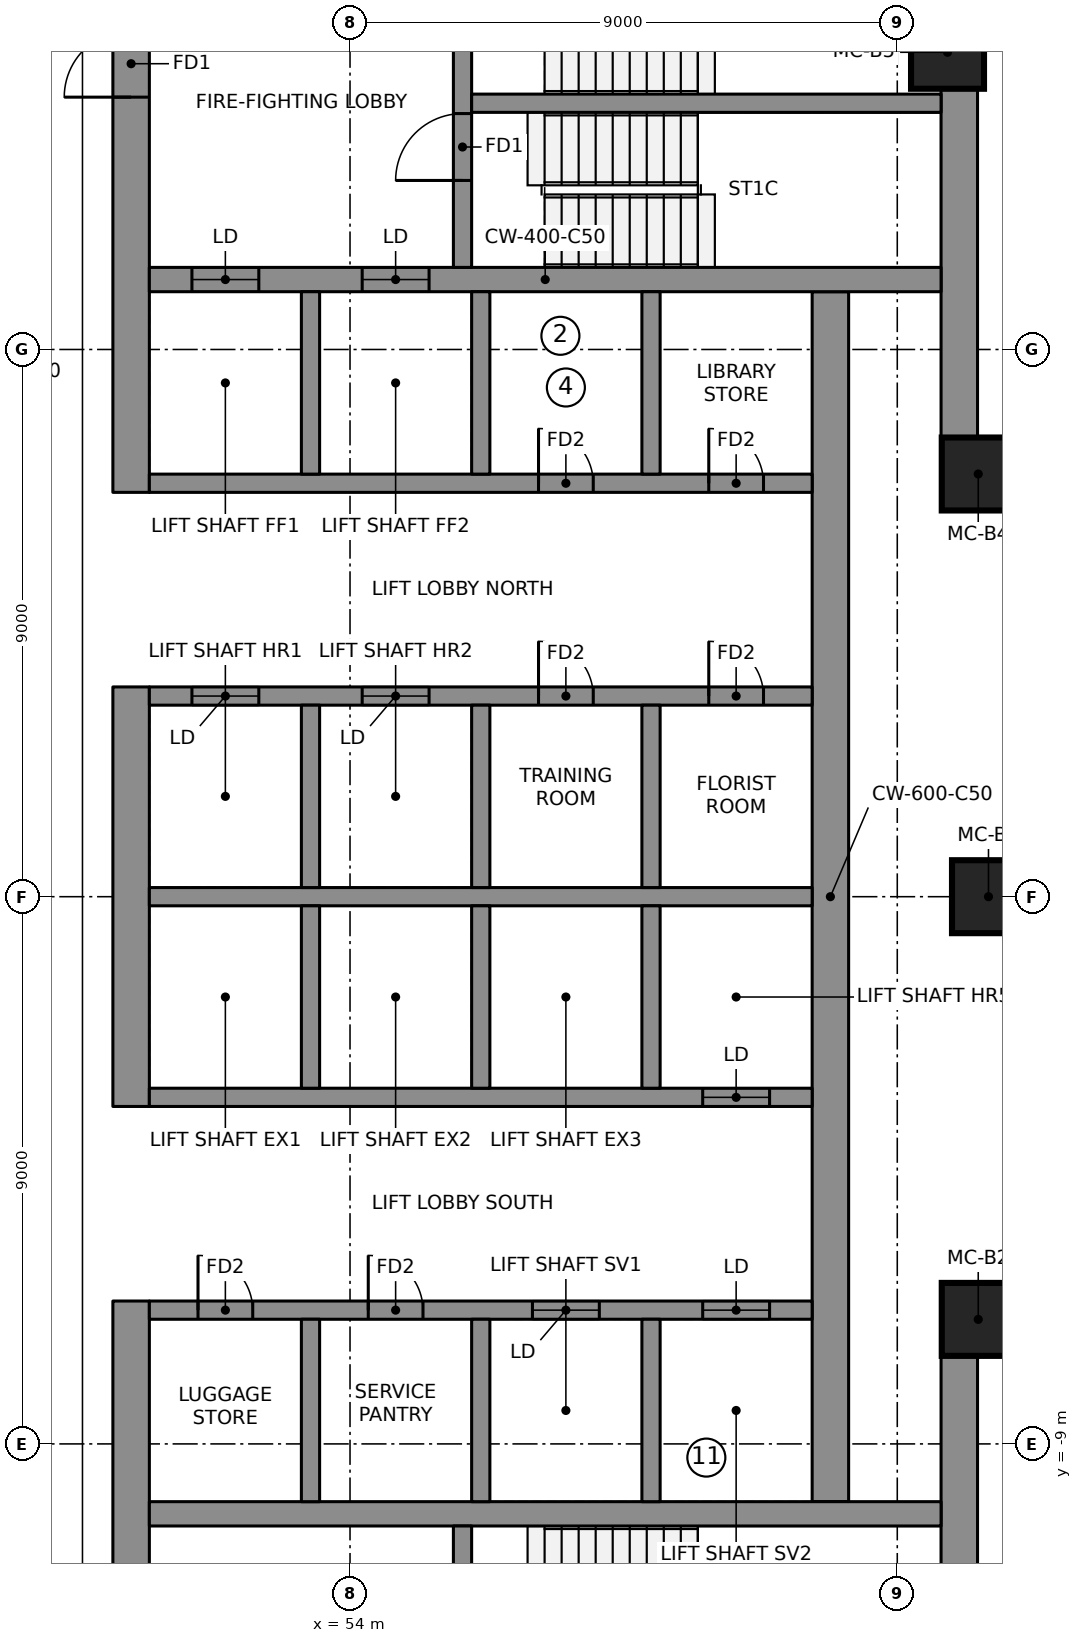
"""IFC4 building model, lengths in metres.
Left out: names, types, materials, properties, quantities, classifications, styles, units other than length and angle.
Written with IfcOpenShell. Run it as: python <this file> out.ifc"""

import sys

from ifc_helpers import new_model, si_unit, direction, frame, frame_2d, origin, origin_2d, place, context, subcontext, project, spatial, rectangle, extrude, element, fill, save


model = new_model("IFC4")
c1 = context("Model", 3, precision=1e-05, world=origin(), true_north=direction((0.0, 1.0)))
c2 = subcontext(c1, "Body", "Model", "MODEL_VIEW")
j1 = project(units=[si_unit("LENGTHUNIT", "METRE"), si_unit("PLANEANGLEUNIT", "RADIAN")], contexts=[c1])
p1 = place(None, origin())
s1 = spatial("IfcSite", under=j1, at=p1, CompositionType="ELEMENT")
p2 = place(p1, origin())
s2 = spatial("IfcBuilding", under=s1, at=p2, CompositionType="ELEMENT")
p3 = place(p2, frame((0.0, 0.0, 235.0)))
s3 = spatial("IfcBuildingStorey", under=s2, at=p3, CompositionType="ELEMENT", Elevation=235.0)
p4 = place(p3, frame((50.4, 6.65, 0.0), z_axis=(0.0, 0.0, 1.0), x_axis=(0.0, 1.0, 0.0)))
e1 = element("IfcWall", 1, at=p4, inside=s3, PredefinedType="SHEAR", context=c2, shape_type="SweptSolid", body=[
    extrude(rectangle(XDim=9.7, YDim=0.6, at=frame_2d((4.85, 0.0))), origin(), (0.0, 0.0, 1.0), 3.55),
])
p5 = place(p4, frame((6.5, 0.0, 0.0)))
e2 = element("IfcOpeningElement", 2, at=p5, cuts=e1, PredefinedType="OPENING", context=c2, shape_type="SweptSolid", body=[
    extrude(rectangle(XDim=1.1, YDim=2.1, at=frame_2d((0.55, 1.05))), frame((0.0, 0.31, 0.0), z_axis=(0.0, -1.0, 0.0), x_axis=(1.0, 0.0, 0.0)), (0.0, 0.0, 1.0), 0.62),
])
p6 = place(p3, frame((50.4, -3.45, 0.0), z_axis=(0.0, 0.0, 1.0), x_axis=(0.0, 1.0, 0.0)))
e3 = element("IfcWall", 3, at=p6, inside=s3, PredefinedType="SHEAR", context=c2, shape_type="SweptSolid", body=[
    extrude(rectangle(XDim=6.9, YDim=0.6, at=frame_2d((3.45, 0.0))), origin(), (0.0, 0.0, 1.0), 3.55),
])
p7 = place(p3, frame((50.4, -16.35, 0.0), z_axis=(0.0, 0.0, 1.0), x_axis=(0.0, 1.0, 0.0)))
e4 = element("IfcWall", 4, at=p7, inside=s3, PredefinedType="SHEAR", context=c2, shape_type="SweptSolid", body=[
    extrude(rectangle(XDim=9.7, YDim=0.6, at=frame_2d((4.85, 0.0))), origin(), (0.0, 0.0, 1.0), 3.55),
])
p8 = place(p7, frame((2.1, 0.0, 0.0)))
e5 = element("IfcOpeningElement", 5, at=p8, cuts=e4, PredefinedType="OPENING", context=c2, shape_type="SweptSolid", body=[
    extrude(rectangle(XDim=1.1, YDim=2.1, at=frame_2d((0.55, 1.05))), frame((0.0, 0.31, 0.0), z_axis=(0.0, -1.0, 0.0), x_axis=(1.0, 0.0, 0.0)), (0.0, 0.0, 1.0), 0.62),
])
for number, where, z_axis, x_axis in (
    (6, (64.02, 7.502, 0.0), (0.0, 0.0, 1.0), (0.0, 1.0, 0.0)),
    (7, (64.02, -15.75, 0.0), (0.0, 0.0, 1.0), (0.0, 1.0, 0.0)),
):
    element("IfcWall", number, at=place(p3, frame(where, z_axis=z_axis, x_axis=x_axis)), inside=s3, PredefinedType="SHEAR", context=c2, shape_type="SweptSolid", body=[
        extrude(rectangle(XDim=8.248, YDim=0.6, at=frame_2d((4.124, 0.0))), origin(), (0.0, 0.0, 1.0), 3.55),
    ])
p9 = place(p3, frame((61.9, -9.95, 0.0), z_axis=(0.0, 0.0, 1.0), x_axis=(0.0, 1.0, 0.0)))
e8 = element("IfcWall", 8, at=p9, inside=s3, PredefinedType="SHEAR", context=c2, shape_type="SweptSolid", body=[
    extrude(rectangle(XDim=19.9, YDim=0.6, at=frame_2d((9.95, 0.0))), origin(), (0.0, 0.0, 1.0), 3.55),
])
p10 = place(p3, frame((50.7, 10.15, 0.0), z_axis=(0.0, 0.0, 1.0), x_axis=(1.0, 0.0, 0.0)))
e9 = element("IfcWall", 9, at=p10, inside=s3, PredefinedType="SHEAR", context=c2, shape_type="SweptSolid", body=[
    extrude(rectangle(XDim=13.02, YDim=0.4, at=frame_2d((6.51, 0.0))), origin(), (0.0, 0.0, 1.0), 3.55),
])
p11 = place(p10, frame((0.7, 0.0, 0.0)))
e10 = element("IfcOpeningElement", 10, at=p11, cuts=e9, PredefinedType="OPENING", context=c2, shape_type="SweptSolid", body=[
    extrude(rectangle(XDim=1.1, YDim=2.1, at=frame_2d((0.55, 1.05))), frame((0.0, 0.21, 0.0), z_axis=(0.0, -1.0, 0.0), x_axis=(1.0, 0.0, 0.0)), (0.0, 0.0, 1.0), 0.42),
])
p12 = place(p10, frame((3.5, 0.0, 0.0)))
e11 = element("IfcOpeningElement", 11, at=p12, cuts=e9, PredefinedType="OPENING", context=c2, shape_type="SweptSolid", body=[
    extrude(rectangle(XDim=1.1, YDim=2.1, at=frame_2d((0.55, 1.05))), frame((0.0, 0.21, 0.0), z_axis=(0.0, -1.0, 0.0), x_axis=(1.0, 0.0, 0.0)), (0.0, 0.0, 1.0), 0.42),
])
p13 = place(p3, frame((50.7, -10.15, 0.0), z_axis=(0.0, 0.0, 1.0), x_axis=(1.0, 0.0, 0.0)))
e12 = element("IfcWall", 12, at=p13, inside=s3, PredefinedType="SHEAR", context=c2, shape_type="SweptSolid", body=[
    extrude(rectangle(XDim=13.02, YDim=0.4, at=frame_2d((6.51, 0.0))), origin(), (0.0, 0.0, 1.0), 3.55),
])
p14 = place(p3, frame((50.7, 0.0, 0.0), z_axis=(0.0, 0.0, 1.0), x_axis=(1.0, 0.0, 0.0)))
e13 = element("IfcWall", 13, at=p14, inside=s3, PredefinedType="SHEAR", context=c2, shape_type="SweptSolid", body=[
    extrude(rectangle(XDim=10.9, YDim=0.3, at=frame_2d((5.45, 0.0))), origin(), (0.0, 0.0, 1.0), 3.55),
])
p15 = place(p3, frame((50.7, 3.3, 0.0), z_axis=(0.0, 0.0, 1.0), x_axis=(1.0, 0.0, 0.0)))
e14 = element("IfcWall", 14, at=p15, inside=s3, PredefinedType="SHEAR", context=c2, shape_type="SweptSolid", body=[
    extrude(rectangle(XDim=10.9, YDim=0.3, at=frame_2d((5.45, 0.0))), origin(), (0.0, 0.0, 1.0), 3.55),
])
p16 = place(p15, frame((0.7, 0.0, 0.0)))
e15 = element("IfcOpeningElement", 15, at=p16, cuts=e14, PredefinedType="OPENING", context=c2, shape_type="SweptSolid", body=[
    extrude(rectangle(XDim=1.1, YDim=2.1, at=frame_2d((0.55, 1.05))), frame((0.0, 0.16, 0.0), z_axis=(0.0, -1.0, 0.0), x_axis=(1.0, 0.0, 0.0)), (0.0, 0.0, 1.0), 0.32),
])
p17 = place(p15, frame((3.5, 0.0, 0.0)))
e16 = element("IfcOpeningElement", 16, at=p17, cuts=e14, PredefinedType="OPENING", context=c2, shape_type="SweptSolid", body=[
    extrude(rectangle(XDim=1.1, YDim=2.1, at=frame_2d((0.55, 1.05))), frame((0.0, 0.16, 0.0), z_axis=(0.0, -1.0, 0.0), x_axis=(1.0, 0.0, 0.0)), (0.0, 0.0, 1.0), 0.32),
])
p18 = place(p15, frame((6.4, 0.0, 0.0)))
e17 = element("IfcOpeningElement", 17, at=p18, cuts=e14, PredefinedType="OPENING", context=c2, shape_type="SweptSolid", body=[
    extrude(rectangle(XDim=0.9, YDim=2.1, at=frame_2d((0.45, 1.05))), frame((0.0, 0.16, 0.0), z_axis=(0.0, -1.0, 0.0), x_axis=(1.0, 0.0, 0.0)), (0.0, 0.0, 1.0), 0.32),
])
p19 = place(p15, frame((9.2, 0.0, 0.0)))
e18 = element("IfcOpeningElement", 18, at=p19, cuts=e14, PredefinedType="OPENING", context=c2, shape_type="SweptSolid", body=[
    extrude(rectangle(XDim=0.9, YDim=2.1, at=frame_2d((0.45, 1.05))), frame((0.0, 0.16, 0.0), z_axis=(0.0, -1.0, 0.0), x_axis=(1.0, 0.0, 0.0)), (0.0, 0.0, 1.0), 0.32),
])
p20 = place(p3, frame((50.7, 6.8, 0.0), z_axis=(0.0, 0.0, 1.0), x_axis=(1.0, 0.0, 0.0)))
e19 = element("IfcWall", 19, at=p20, inside=s3, PredefinedType="SHEAR", context=c2, shape_type="SweptSolid", body=[
    extrude(rectangle(XDim=10.9, YDim=0.3, at=frame_2d((5.45, 0.0))), origin(), (0.0, 0.0, 1.0), 3.55),
])
p21 = place(p20, frame((6.4, 0.0, 0.0)))
e20 = element("IfcOpeningElement", 20, at=p21, cuts=e19, PredefinedType="OPENING", context=c2, shape_type="SweptSolid", body=[
    extrude(rectangle(XDim=0.9, YDim=2.1, at=frame_2d((0.45, 1.05))), frame((0.0, 0.16, 0.0), z_axis=(0.0, -1.0, 0.0), x_axis=(1.0, 0.0, 0.0)), (0.0, 0.0, 1.0), 0.32),
])
p22 = place(p20, frame((9.2, 0.0, 0.0)))
e21 = element("IfcOpeningElement", 21, at=p22, cuts=e19, PredefinedType="OPENING", context=c2, shape_type="SweptSolid", body=[
    extrude(rectangle(XDim=0.9, YDim=2.1, at=frame_2d((0.45, 1.05))), frame((0.0, 0.16, 0.0), z_axis=(0.0, -1.0, 0.0), x_axis=(1.0, 0.0, 0.0)), (0.0, 0.0, 1.0), 0.32),
])
for number, where, z_axis, x_axis in (
    (22, (53.35, 0.15, 0.0), (0.0, 0.0, 1.0), (0.0, 1.0, 0.0)),
    (23, (53.35, 6.95, 0.0), (0.0, 0.0, 1.0), (0.0, 1.0, 0.0)),
    (24, (56.15, 0.15, 0.0), (0.0, 0.0, 1.0), (0.0, 1.0, 0.0)),
    (25, (56.15, 6.95, 0.0), (0.0, 0.0, 1.0), (0.0, 1.0, 0.0)),
    (26, (58.95, 0.15, 0.0), (0.0, 0.0, 1.0), (0.0, 1.0, 0.0)),
    (27, (58.95, 6.95, 0.0), (0.0, 0.0, 1.0), (0.0, 1.0, 0.0)),
):
    element("IfcWall", number, at=place(p3, frame(where, z_axis=z_axis, x_axis=x_axis)), inside=s3, PredefinedType="SHEAR", context=c2, shape_type="SweptSolid", body=[
        extrude(rectangle(XDim=3.0, YDim=0.3, at=frame_2d((1.5, 0.0))), origin(), (0.0, 0.0, 1.0), 3.55),
    ])
p23 = place(p3, frame((50.7, -3.3, 0.0), z_axis=(0.0, 0.0, 1.0), x_axis=(1.0, 0.0, 0.0)))
e28 = element("IfcWall", 28, at=p23, inside=s3, PredefinedType="SHEAR", context=c2, shape_type="SweptSolid", body=[
    extrude(rectangle(XDim=10.9, YDim=0.3, at=frame_2d((5.45, 0.0))), origin(), (0.0, 0.0, 1.0), 3.55),
])
p24 = place(p23, frame((9.1, 0.0, 0.0)))
e29 = element("IfcOpeningElement", 29, at=p24, cuts=e28, PredefinedType="OPENING", context=c2, shape_type="SweptSolid", body=[
    extrude(rectangle(XDim=1.1, YDim=2.1, at=frame_2d((0.55, 1.05))), frame((0.0, 0.16, 0.0), z_axis=(0.0, -1.0, 0.0), x_axis=(1.0, 0.0, 0.0)), (0.0, 0.0, 1.0), 0.32),
])
p25 = place(p3, frame((50.7, -6.8, 0.0), z_axis=(0.0, 0.0, 1.0), x_axis=(1.0, 0.0, 0.0)))
e30 = element("IfcWall", 30, at=p25, inside=s3, PredefinedType="SHEAR", context=c2, shape_type="SweptSolid", body=[
    extrude(rectangle(XDim=10.9, YDim=0.3, at=frame_2d((5.45, 0.0))), origin(), (0.0, 0.0, 1.0), 3.55),
])
p26 = place(p25, frame((6.3, 0.0, 0.0)))
e31 = element("IfcOpeningElement", 31, at=p26, cuts=e30, PredefinedType="OPENING", context=c2, shape_type="SweptSolid", body=[
    extrude(rectangle(XDim=1.1, YDim=2.1, at=frame_2d((0.55, 1.05))), frame((0.0, 0.16, 0.0), z_axis=(0.0, -1.0, 0.0), x_axis=(1.0, 0.0, 0.0)), (0.0, 0.0, 1.0), 0.32),
])
p27 = place(p25, frame((9.1, 0.0, 0.0)))
e32 = element("IfcOpeningElement", 32, at=p27, cuts=e30, PredefinedType="OPENING", context=c2, shape_type="SweptSolid", body=[
    extrude(rectangle(XDim=1.1, YDim=2.1, at=frame_2d((0.55, 1.05))), frame((0.0, 0.16, 0.0), z_axis=(0.0, -1.0, 0.0), x_axis=(1.0, 0.0, 0.0)), (0.0, 0.0, 1.0), 0.32),
])
p28 = place(p25, frame((0.8, 0.0, 0.0)))
e33 = element("IfcOpeningElement", 33, at=p28, cuts=e30, PredefinedType="OPENING", context=c2, shape_type="SweptSolid", body=[
    extrude(rectangle(XDim=0.9, YDim=2.1, at=frame_2d((0.45, 1.05))), frame((0.0, 0.16, 0.0), z_axis=(0.0, -1.0, 0.0), x_axis=(1.0, 0.0, 0.0)), (0.0, 0.0, 1.0), 0.32),
])
p29 = place(p25, frame((3.6, 0.0, 0.0)))
e34 = element("IfcOpeningElement", 34, at=p29, cuts=e30, PredefinedType="OPENING", context=c2, shape_type="SweptSolid", body=[
    extrude(rectangle(XDim=0.9, YDim=2.1, at=frame_2d((0.45, 1.05))), frame((0.0, 0.16, 0.0), z_axis=(0.0, -1.0, 0.0), x_axis=(1.0, 0.0, 0.0)), (0.0, 0.0, 1.0), 0.32),
])
for number, where, z_axis, x_axis in (
    (35, (53.35, -3.15, 0.0), (0.0, 0.0, 1.0), (0.0, 1.0, 0.0)),
    (36, (53.35, -9.95, 0.0), (0.0, 0.0, 1.0), (0.0, 1.0, 0.0)),
    (37, (56.15, -3.15, 0.0), (0.0, 0.0, 1.0), (0.0, 1.0, 0.0)),
    (38, (56.15, -9.95, 0.0), (0.0, 0.0, 1.0), (0.0, 1.0, 0.0)),
    (39, (58.95, -3.15, 0.0), (0.0, 0.0, 1.0), (0.0, 1.0, 0.0)),
    (40, (58.95, -9.95, 0.0), (0.0, 0.0, 1.0), (0.0, 1.0, 0.0)),
):
    element("IfcWall", number, at=place(p3, frame(where, z_axis=z_axis, x_axis=x_axis)), inside=s3, PredefinedType="SHEAR", context=c2, shape_type="SweptSolid", body=[
        extrude(rectangle(XDim=3.0, YDim=0.3, at=frame_2d((1.5, 0.0))), origin(), (0.0, 0.0, 1.0), 3.55),
    ])
p30 = place(p3, frame((55.85, 10.35, 0.0), z_axis=(0.0, 0.0, 1.0), x_axis=(0.0, 1.0, 0.0)))
e41 = element("IfcWall", 41, at=p30, inside=s3, PredefinedType="SHEAR", context=c2, shape_type="SweptSolid", body=[
    extrude(rectangle(XDim=5.4, YDim=0.3, at=frame_2d((2.7, 0.0))), origin(), (0.0, 0.0, 1.0), 3.55),
])
p31 = place(p30, frame((1.43, 0.0, 0.0)))
e42 = element("IfcOpeningElement", 42, at=p31, cuts=e41, PredefinedType="OPENING", context=c2, shape_type="SweptSolid", body=[
    extrude(rectangle(XDim=1.1, YDim=2.1, at=frame_2d((0.55, 1.05))), frame((0.0, 0.16, 0.0), z_axis=(0.0, -1.0, 0.0), x_axis=(1.0, 0.0, 0.0)), (0.0, 0.0, 1.0), 0.32),
])
p32 = place(p30, frame((3.6, 0.0, 0.0)))
e43 = element("IfcOpeningElement", 43, at=p32, cuts=e41, PredefinedType="OPENING", context=c2, shape_type="SweptSolid", body=[
    extrude(rectangle(XDim=1.1, YDim=2.1, at=frame_2d((0.55, 1.05))), frame((0.0, 0.16, 0.0), z_axis=(0.0, -1.0, 0.0), x_axis=(1.0, 0.0, 0.0)), (0.0, 0.0, 1.0), 0.32),
])
p33 = place(p3, frame((55.85, -15.75, 0.0), z_axis=(0.0, 0.0, 1.0), x_axis=(0.0, 1.0, 0.0)))
e44 = element("IfcWall", 44, at=p33, inside=s3, PredefinedType="SHEAR", context=c2, shape_type="SweptSolid", body=[
    extrude(rectangle(XDim=5.4, YDim=0.3, at=frame_2d((2.7, 0.0))), origin(), (0.0, 0.0, 1.0), 3.55),
])
p34 = place(p33, frame((3.6, 0.0, 0.0)))
e45 = element("IfcOpeningElement", 45, at=p34, cuts=e44, PredefinedType="OPENING", context=c2, shape_type="SweptSolid", body=[
    extrude(rectangle(XDim=1.1, YDim=2.1, at=frame_2d((0.55, 1.05))), frame((0.0, 0.16, 0.0), z_axis=(0.0, -1.0, 0.0), x_axis=(1.0, 0.0, 0.0)), (0.0, 0.0, 1.0), 0.32),
])
p35 = place(p33, frame((0.8, 0.0, 0.0)))
e46 = element("IfcOpeningElement", 46, at=p35, cuts=e44, PredefinedType="OPENING", context=c2, shape_type="SweptSolid", body=[
    extrude(rectangle(XDim=0.9, YDim=2.1, at=frame_2d((0.45, 1.05))), frame((0.0, 0.16, 0.0), z_axis=(0.0, -1.0, 0.0), x_axis=(1.0, 0.0, 0.0)), (0.0, 0.0, 1.0), 0.32),
])
p36 = place(p3, frame((56.0, 13.05, 0.0), z_axis=(0.0, 0.0, 1.0), x_axis=(1.0, 0.0, 0.0)))
e47 = element("IfcWall", 47, at=p36, inside=s3, PredefinedType="SHEAR", context=c2, shape_type="SweptSolid", body=[
    extrude(rectangle(XDim=7.72, YDim=0.3, at=frame_2d((3.86, 0.0))), origin(), (0.0, 0.0, 1.0), 3.55),
])
for number, where, z_axis, x_axis in (
    (48, (64.332, -6.952, 0.0), (0.0, 0.0, 1.0), (1.0, 0.0, 0.0)),
    (49, (64.5, 0.0, 0.0), (0.0, 0.0, 1.0), (1.0, 0.0, 0.0)),
    (50, (64.332, 6.952, 0.0), (0.0, 0.0, 1.0), (1.0, 0.0, 0.0)),
    (51, (63.826, 13.888, 0.0), (0.0, 0.0, 1.0), (1.0, 0.0, 0.0)),
):
    element("IfcColumn", number, at=place(p3, frame(where, z_axis=z_axis, x_axis=x_axis)), inside=s3, PredefinedType="COLUMN", context=c2, shape_type="SweptSolid", body=[
        extrude(rectangle(XDim=1.2, YDim=1.2, at=origin_2d()), origin(), (0.0, 0.0, 1.0), 3.55),
    ])
p37 = place(p11, origin())
e52 = element("IfcDoor", 52, at=p37, inside=s3, OperationType="DOUBLE_DOOR_SLIDING", PredefinedType="DOOR", context=c2, shape_type="SweptSolid", body=[
    extrude(rectangle(XDim=1.1, YDim=2.1, at=frame_2d((0.55, 1.05))), frame((0.0, 0.025, 0.0), z_axis=(0.0, -1.0, 0.0), x_axis=(1.0, 0.0, 0.0)), (0.0, 0.0, 1.0), 0.05),
])
fill(e10, e52)
p38 = place(p12, origin())
e53 = element("IfcDoor", 53, at=p38, inside=s3, OperationType="DOUBLE_DOOR_SLIDING", PredefinedType="DOOR", context=c2, shape_type="SweptSolid", body=[
    extrude(rectangle(XDim=1.1, YDim=2.1, at=frame_2d((0.55, 1.05))), frame((0.0, 0.025, 0.0), z_axis=(0.0, -1.0, 0.0), x_axis=(1.0, 0.0, 0.0)), (0.0, 0.0, 1.0), 0.05),
])
fill(e11, e53)
p39 = place(p16, origin())
e54 = element("IfcDoor", 54, at=p39, inside=s3, OperationType="DOUBLE_DOOR_SLIDING", PredefinedType="DOOR", context=c2, shape_type="SweptSolid", body=[
    extrude(rectangle(XDim=1.1, YDim=2.1, at=frame_2d((0.55, 1.05))), frame((0.0, 0.025, 0.0), z_axis=(0.0, -1.0, 0.0), x_axis=(1.0, 0.0, 0.0)), (0.0, 0.0, 1.0), 0.05),
])
fill(e15, e54)
p40 = place(p17, origin())
e55 = element("IfcDoor", 55, at=p40, inside=s3, OperationType="DOUBLE_DOOR_SLIDING", PredefinedType="DOOR", context=c2, shape_type="SweptSolid", body=[
    extrude(rectangle(XDim=1.1, YDim=2.1, at=frame_2d((0.55, 1.05))), frame((0.0, 0.025, 0.0), z_axis=(0.0, -1.0, 0.0), x_axis=(1.0, 0.0, 0.0)), (0.0, 0.0, 1.0), 0.05),
])
fill(e16, e55)
p41 = place(p24, origin())
e56 = element("IfcDoor", 56, at=p41, inside=s3, OperationType="DOUBLE_DOOR_SLIDING", PredefinedType="DOOR", context=c2, shape_type="SweptSolid", body=[
    extrude(rectangle(XDim=1.1, YDim=2.1, at=frame_2d((0.55, 1.05))), frame((0.0, 0.025, 0.0), z_axis=(0.0, -1.0, 0.0), x_axis=(1.0, 0.0, 0.0)), (0.0, 0.0, 1.0), 0.05),
])
fill(e29, e56)
p42 = place(p26, origin())
e57 = element("IfcDoor", 57, at=p42, inside=s3, OperationType="DOUBLE_DOOR_SLIDING", PredefinedType="DOOR", context=c2, shape_type="SweptSolid", body=[
    extrude(rectangle(XDim=1.1, YDim=2.1, at=frame_2d((0.55, 1.05))), frame((0.0, 0.025, 0.0), z_axis=(0.0, -1.0, 0.0), x_axis=(1.0, 0.0, 0.0)), (0.0, 0.0, 1.0), 0.05),
])
fill(e31, e57)
p43 = place(p27, origin())
e58 = element("IfcDoor", 58, at=p43, inside=s3, OperationType="DOUBLE_DOOR_SLIDING", PredefinedType="DOOR", context=c2, shape_type="SweptSolid", body=[
    extrude(rectangle(XDim=1.1, YDim=2.1, at=frame_2d((0.55, 1.05))), frame((0.0, 0.025, 0.0), z_axis=(0.0, -1.0, 0.0), x_axis=(1.0, 0.0, 0.0)), (0.0, 0.0, 1.0), 0.05),
])
fill(e32, e58)
p44 = place(p31, origin())
e59 = element("IfcDoor", 59, at=p44, inside=s3, OperationType="SINGLE_SWING_RIGHT", PredefinedType="DOOR", context=c2, shape_type="SweptSolid", body=[
    extrude(rectangle(XDim=1.1, YDim=2.1, at=frame_2d((0.55, 1.05))), frame((0.0, 0.025, 0.0), z_axis=(0.0, -1.0, 0.0), x_axis=(1.0, 0.0, 0.0)), (0.0, 0.0, 1.0), 0.05),
])
fill(e42, e59)
p45 = place(p5, origin())
e60 = element("IfcDoor", 60, at=p45, inside=s3, OperationType="SINGLE_SWING_RIGHT", PredefinedType="DOOR", context=c2, shape_type="SweptSolid", body=[
    extrude(rectangle(XDim=1.1, YDim=2.1, at=frame_2d((0.55, 1.05))), frame((0.0, 0.025, 0.0), z_axis=(0.0, -1.0, 0.0), x_axis=(1.0, 0.0, 0.0)), (0.0, 0.0, 1.0), 0.05),
])
fill(e2, e60)
p46 = place(p21, origin())
e61 = element("IfcDoor", 61, at=p46, inside=s3, OperationType="SINGLE_SWING_LEFT", PredefinedType="DOOR", context=c2, shape_type="SweptSolid", body=[
    extrude(rectangle(XDim=0.9, YDim=2.1, at=frame_2d((0.45, 1.05))), frame((0.0, 0.025, 0.0), z_axis=(0.0, -1.0, 0.0), x_axis=(1.0, 0.0, 0.0)), (0.0, 0.0, 1.0), 0.05),
])
fill(e20, e61)
p47 = place(p22, origin())
e62 = element("IfcDoor", 62, at=p47, inside=s3, OperationType="SINGLE_SWING_LEFT", PredefinedType="DOOR", context=c2, shape_type="SweptSolid", body=[
    extrude(rectangle(XDim=0.9, YDim=2.1, at=frame_2d((0.45, 1.05))), frame((0.0, 0.025, 0.0), z_axis=(0.0, -1.0, 0.0), x_axis=(1.0, 0.0, 0.0)), (0.0, 0.0, 1.0), 0.05),
])
fill(e21, e62)
p48 = place(p18, origin())
e63 = element("IfcDoor", 63, at=p48, inside=s3, OperationType="SINGLE_SWING_LEFT", PredefinedType="DOOR", context=c2, shape_type="SweptSolid", body=[
    extrude(rectangle(XDim=0.9, YDim=2.1, at=frame_2d((0.45, 1.05))), frame((0.0, 0.025, 0.0), z_axis=(0.0, -1.0, 0.0), x_axis=(1.0, 0.0, 0.0)), (0.0, 0.0, 1.0), 0.05),
])
fill(e17, e63)
p49 = place(p19, origin())
e64 = element("IfcDoor", 64, at=p49, inside=s3, OperationType="SINGLE_SWING_LEFT", PredefinedType="DOOR", context=c2, shape_type="SweptSolid", body=[
    extrude(rectangle(XDim=0.9, YDim=2.1, at=frame_2d((0.45, 1.05))), frame((0.0, 0.025, 0.0), z_axis=(0.0, -1.0, 0.0), x_axis=(1.0, 0.0, 0.0)), (0.0, 0.0, 1.0), 0.05),
])
fill(e18, e64)
p50 = place(p28, origin())
e65 = element("IfcDoor", 65, at=p50, inside=s3, OperationType="SINGLE_SWING_LEFT", PredefinedType="DOOR", context=c2, shape_type="SweptSolid", body=[
    extrude(rectangle(XDim=0.9, YDim=2.1, at=frame_2d((0.45, 1.05))), frame((0.0, 0.025, 0.0), z_axis=(0.0, -1.0, 0.0), x_axis=(1.0, 0.0, 0.0)), (0.0, 0.0, 1.0), 0.05),
])
fill(e33, e65)
p51 = place(p29, origin())
e66 = element("IfcDoor", 66, at=p51, inside=s3, OperationType="SINGLE_SWING_LEFT", PredefinedType="DOOR", context=c2, shape_type="SweptSolid", body=[
    extrude(rectangle(XDim=0.9, YDim=2.1, at=frame_2d((0.45, 1.05))), frame((0.0, 0.025, 0.0), z_axis=(0.0, -1.0, 0.0), x_axis=(1.0, 0.0, 0.0)), (0.0, 0.0, 1.0), 0.05),
])
fill(e34, e66)
save(model, sys.argv[1])
